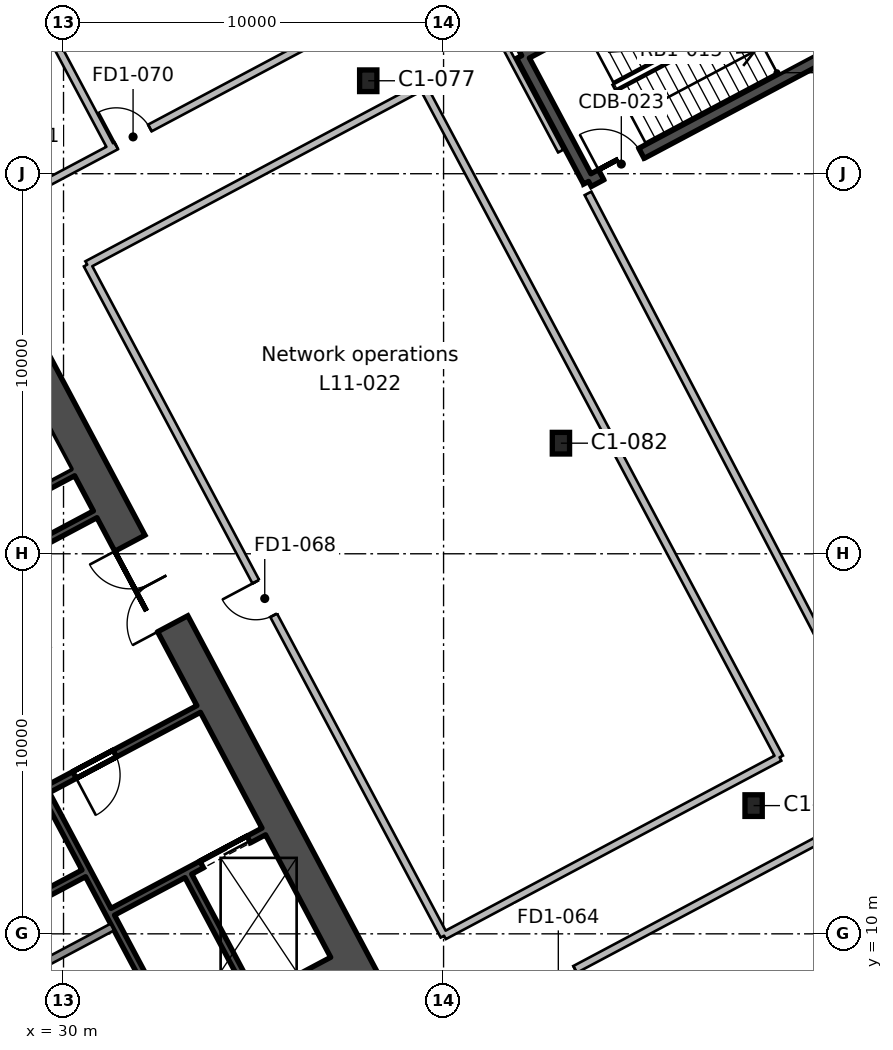
"""IFC4 building model, lengths in metres.
Left out: names, types, materials, properties, quantities, classifications, styles, units other than length and angle.
Written with IfcOpenShell. Run it as: python <this file> out.ifc"""

import sys

from ifc_helpers import new_model, si_unit, direction, frame, frame_2d, origin, origin_2d, place, context, subcontext, project, spatial, rectangle, i_section, extrude, element, fill, save


model = new_model("IFC4")
c1 = context("Model", 3, precision=1e-05, world=origin(), true_north=direction((0.0, 1.0)))
c2 = subcontext(c1, "Body", "Model", "MODEL_VIEW")
j1 = project(units=[si_unit("LENGTHUNIT", "METRE"), si_unit("PLANEANGLEUNIT", "RADIAN")], contexts=[c1])
p1 = place(None, origin())
s1 = spatial("IfcSite", under=j1, at=p1, CompositionType="ELEMENT")
p2 = place(p1, origin())
s2 = spatial("IfcBuilding", under=s1, at=p2, CompositionType="ELEMENT")
p3 = place(p2, frame((0.0, 0.0, 60.8)))
s3 = spatial("IfcBuildingStorey", under=s2, at=p3, CompositionType="ELEMENT", Elevation=60.8)
for number, where, z_axis, x_axis in (
    (1, (48.158, 13.374, 0.0), (0.0, 0.0, 1.0), (1.0, 0.0, 0.0)),
    (2, (43.088, 22.91, 0.0), (0.0, 0.0, 1.0), (1.0, 0.0, 0.0)),
    (3, (38.018, 32.446, 0.0), (0.0, 0.0, 1.0), (1.0, 0.0, 0.0)),
):
    element("IfcColumn", number, at=place(p3, frame(where, z_axis=z_axis, x_axis=x_axis)), inside=s3, PredefinedType="COLUMN", context=c2, shape_type="SweptSolid", body=[
        extrude(i_section(OverallWidth=0.455, OverallDepth=0.569, WebThickness=0.078, FlangeThickness=0.125, FilletRadius=0.015, at=origin_2d()), origin(), (0.0, 0.0, 1.0), 5.4),
    ])
p4 = place(p3, frame((37.849, 8.799, 0.0), z_axis=(0.0, 0.0, 1.0), x_axis=(-0.469465789982, 0.882950662289, 0.0)))
e4 = element("IfcWall", 4, at=p4, inside=s3, PredefinedType="SHEAR", context=c2, shape_type="SweptSolid", body=[
    extrude(rectangle(XDim=20.0, YDim=0.9, at=frame_2d((10.0, 0.0))), origin(), (0.0, 0.0, 1.0), 5.4),
])
p5 = place(p4, frame((10.6, 0.0, 0.0)))
e5 = element("IfcOpeningElement", 5, at=p5, cuts=e4, PredefinedType="OPENING", context=c2, shape_type="SweptSolid", body=[
    extrude(rectangle(XDim=2.4, YDim=2.4, at=frame_2d((1.2, 1.2))), frame((0.0, 0.46, 0.0), z_axis=(0.0, -1.0, 0.0), x_axis=(1.0, 0.0, 0.0)), (0.0, 0.0, 1.0), 0.92),
])
p6 = place(p3, frame((19.405, -0.498, 0.0), z_axis=(0.0, 0.0, 1.0), x_axis=(0.88294509198, 0.469476266226, 0.0)))
e6 = element("IfcWall", 6, at=p6, inside=s3, PredefinedType="SHEAR", context=c2, shape_type="SweptSolid", body=[
    extrude(rectangle(XDim=20.2, YDim=0.9, at=frame_2d((10.1, 0.0))), origin(), (0.0, 0.0, 1.0), 5.4),
])
p7 = place(p3, frame((32.968, 7.223, 0.0), z_axis=(0.0, 0.0, 1.0), x_axis=(-0.469480409012, 0.88294288918, 0.0)))
e7 = element("IfcWall", 7, at=p7, inside=s3, PredefinedType="SHEAR", context=c2, shape_type="SweptSolid", body=[
    extrude(rectangle(XDim=7.3, YDim=0.2, at=frame_2d((3.65, 0.0))), origin(), (0.0, 0.0, 1.0), 5.4),
])
p8 = place(p3, frame((34.999, 8.303, 0.0), z_axis=(0.0, 0.0, 1.0), x_axis=(-0.4694665462, 0.882950260207, 0.0)))
e8 = element("IfcWall", 8, at=p8, inside=s3, PredefinedType="SHEAR", context=c2, shape_type="SweptSolid", body=[
    extrude(rectangle(XDim=3.65, YDim=0.2, at=frame_2d((1.825, 0.0))), origin(), (0.0, 0.0, 1.0), 5.4),
])
p9 = place(p3, frame((26.692, 7.737, 0.0), z_axis=(0.0, 0.0, 1.0), x_axis=(0.882953967957, 0.469459572775, 0.0)))
e9 = element("IfcWall", 9, at=p9, inside=s3, PredefinedType="SOLIDWALL", context=c2, shape_type="SweptSolid", body=[
    extrude(rectangle(XDim=5.2, YDim=0.2, at=frame_2d((2.6, 0.0))), origin(), (0.0, 0.0, 1.0), 5.4),
])
p10 = place(p3, frame((31.296, 10.581, 0.0), z_axis=(0.0, 0.0, 1.0), x_axis=(0.882960433586, 0.469447412093, 0.0)))
e10 = element("IfcWall", 10, at=p10, inside=s3, PredefinedType="SHEAR", context=c2, shape_type="SweptSolid", body=[
    extrude(rectangle(XDim=4.5, YDim=0.2, at=frame_2d((2.25, 0.0))), origin(), (0.0, 0.0, 1.0), 5.4),
])
p11 = place(p10, frame((2.65, 0.0, 0.0)))
e11 = element("IfcOpeningElement", 11, at=p11, cuts=e10, PredefinedType="OPENING", context=c2, shape_type="SweptSolid", body=[
    extrude(rectangle(XDim=1.4, YDim=2.4, at=frame_2d((0.7, 1.2))), frame((0.0, 0.11, 0.0), z_axis=(0.0, -1.0, 0.0), x_axis=(1.0, 0.0, 0.0)), (0.0, 0.0, 1.0), 0.22),
])
p12 = place(p3, frame((25.941, 9.15, 0.0), z_axis=(0.0, 0.0, 1.0), x_axis=(0.882953967957, 0.469459572775, 0.0)))
e12 = element("IfcWall", 12, at=p12, inside=s3, PredefinedType="SHEAR", context=c2, shape_type="SweptSolid", body=[
    extrude(rectangle(XDim=5.2, YDim=0.2, at=frame_2d((2.6, 0.0))), origin(), (0.0, 0.0, 1.0), 5.4),
])
p13 = place(p3, frame((24.726, 11.222, 0.0), z_axis=(0.0, 0.0, 1.0), x_axis=(0.882940221191, 0.469485426614, 0.0)))
e13 = element("IfcWall", 13, at=p13, inside=s3, PredefinedType="SHEAR", context=c2, shape_type="SweptSolid", body=[
    extrude(rectangle(XDim=10.0, YDim=0.2, at=frame_2d((5.0, 0.0))), origin(), (0.0, 0.0, 1.0), 5.4),
])
p14 = place(p13, frame((6.3, 0.0, 0.0)))
e14 = element("IfcOpeningElement", 14, at=p14, cuts=e13, PredefinedType="OPENING", context=c2, shape_type="SweptSolid", body=[
    extrude(rectangle(XDim=1.2, YDim=2.1, at=frame_2d((0.6, 1.05))), frame((0.0, 0.11, 0.0), z_axis=(0.0, -1.0, 0.0), x_axis=(1.0, 0.0, 0.0)), (0.0, 0.0, 1.0), 0.22),
])
p15 = place(p13, frame((2.25, 0.0, 0.0)))
e15 = element("IfcOpeningElement", 15, at=p15, cuts=e13, PredefinedType="OPENING", context=c2, shape_type="SweptSolid", body=[
    extrude(rectangle(XDim=0.9, YDim=2.1, at=frame_2d((0.45, 1.05))), frame((0.0, 0.11, 0.0), z_axis=(0.0, -1.0, 0.0), x_axis=(1.0, 0.0, 0.0)), (0.0, 0.0, 1.0), 0.22),
])
p16 = place(p3, frame((23.769, 17.282, 0.0), z_axis=(0.0, 0.0, 1.0), x_axis=(0.882940221191, 0.469485426614, 0.0)))
e16 = element("IfcWall", 16, at=p16, inside=s3, PredefinedType="SHEAR", context=c2, shape_type="SweptSolid", body=[
    extrude(rectangle(XDim=8.0, YDim=0.2, at=frame_2d((4.0, 0.0))), origin(), (0.0, 0.0, 1.0), 5.4),
])
p17 = place(p3, frame((23.182, 18.385, 0.0), z_axis=(0.0, 0.0, 1.0), x_axis=(0.88295287151, 0.469461634952, 0.0)))
e17 = element("IfcWall", 17, at=p17, inside=s3, PredefinedType="SHEAR", context=c2, shape_type="SweptSolid", body=[
    extrude(rectangle(XDim=8.0, YDim=0.2, at=frame_2d((4.0, 0.0))), origin(), (0.0, 0.0, 1.0), 5.4),
])
p18 = place(p3, frame((51.145, 33.693, 0.0), z_axis=(0.0, 0.0, 1.0), x_axis=(-0.882945809314, -0.469474917132, 0.0)))
e18 = element("IfcWall", 18, at=p18, inside=s3, PredefinedType="SHEAR", context=c2, shape_type="SweptSolid", body=[
    extrude(rectangle(XDim=8.3, YDim=0.3, at=frame_2d((4.15, 0.0))), origin(), (0.0, 0.0, 1.0), 5.4),
])
p19 = place(p18, frame((6.725, 0.0, 0.0)))
e19 = element("IfcOpeningElement", 19, at=p19, cuts=e18, PredefinedType="OPENING", context=c2, shape_type="SweptSolid", body=[
    extrude(rectangle(XDim=1.2, YDim=2.1, at=frame_2d((0.6, 1.05))), frame((0.0, 0.16, 0.0), z_axis=(0.0, -1.0, 0.0), x_axis=(1.0, 0.0, 0.0)), (0.0, 0.0, 1.0), 0.32),
])
p20 = place(p3, frame((43.816, 29.796, 0.0), z_axis=(0.0, 0.0, 1.0), x_axis=(-0.46946936446, 0.882948761726, 0.0)))
e20 = element("IfcWall", 20, at=p20, inside=s3, PredefinedType="SHEAR", context=c2, shape_type="SweptSolid", body=[
    extrude(rectangle(XDim=3.75, YDim=0.3, at=frame_2d((1.875, 0.0))), origin(), (0.0, 0.0, 1.0), 5.4),
])
p21 = place(p3, frame((42.055, 33.107, 0.0), z_axis=(0.0, 0.0, 1.0), x_axis=(0.882945809314, 0.469474917132, 0.0)))
e21 = element("IfcWall", 21, at=p21, inside=s3, PredefinedType="SHEAR", context=c2, shape_type="SweptSolid", body=[
    extrude(rectangle(XDim=8.3, YDim=0.3, at=frame_2d((4.15, 0.0))), origin(), (0.0, 0.0, 1.0), 5.4),
])
p22 = place(p3, frame((0.0, 14.044, 0.0), z_axis=(0.0, 0.0, 1.0), x_axis=(0.882943219941, 0.469479786955, 0.0)))
e22 = element("IfcWall", 22, at=p22, inside=s3, PredefinedType="PARTITIONING", context=c2, shape_type="SweptSolid", body=[
    extrude(rectangle(XDim=65.607, YDim=0.2, at=frame_2d((32.803, 0.0))), origin(), (0.0, 0.0, 1.0), 5.0),
])
p23 = place(p22, frame((35.55, 0.0, 0.0)))
e23 = element("IfcOpeningElement", 23, at=p23, cuts=e22, PredefinedType="OPENING", context=c2, shape_type="SweptSolid", body=[
    extrude(rectangle(XDim=1.0, YDim=2.1, at=frame_2d((0.5, 1.05))), frame((0.0, 0.11, 0.0), z_axis=(0.0, -1.0, 0.0), x_axis=(1.0, 0.0, 0.0)), (0.0, 0.0, 1.0), 0.22),
])
p24 = place(p22, frame((32.15, 0.0, 0.0)))
e24 = element("IfcOpeningElement", 24, at=p24, cuts=e22, PredefinedType="OPENING", context=c2, shape_type="SweptSolid", body=[
    extrude(rectangle(XDim=1.0, YDim=2.1, at=frame_2d((0.5, 1.05))), frame((0.0, 0.11, 0.0), z_axis=(0.0, -1.0, 0.0), x_axis=(1.0, 0.0, 0.0)), (0.0, 0.0, 1.0), 0.22),
])
p25 = place(p22, frame((29.75, 0.0, 0.0)))
e25 = element("IfcOpeningElement", 25, at=p25, cuts=e22, PredefinedType="OPENING", context=c2, shape_type="SweptSolid", body=[
    extrude(rectangle(XDim=1.0, YDim=2.1, at=frame_2d((0.5, 1.05))), frame((0.0, 0.11, 0.0), z_axis=(0.0, -1.0, 0.0), x_axis=(1.0, 0.0, 0.0)), (0.0, 0.0, 1.0), 0.22),
])
p26 = place(p22, frame((13.95, 0.0, 0.0)))
e26 = element("IfcOpeningElement", 26, at=p26, cuts=e22, PredefinedType="OPENING", context=c2, shape_type="SweptSolid", body=[
    extrude(rectangle(XDim=1.0, YDim=2.1, at=frame_2d((0.5, 1.05))), frame((0.0, 0.11, 0.0), z_axis=(0.0, -1.0, 0.0), x_axis=(1.0, 0.0, 0.0)), (0.0, 0.0, 1.0), 0.22),
])
p27 = place(p3, frame((69.57, 22.948, 0.0), z_axis=(0.0, 0.0, 1.0), x_axis=(-0.882939582192, -0.469486628349, 0.0)))
e27 = element("IfcWall", 27, at=p27, inside=s3, PredefinedType="PARTITIONING", context=c2, shape_type="SweptSolid", body=[
    extrude(rectangle(XDim=63.39, YDim=0.2, at=frame_2d((31.695, 0.0))), origin(), (0.0, 0.0, 1.0), 5.0),
])
p28 = place(p27, frame((41.971, 0.0, 0.0)))
e28 = element("IfcOpeningElement", 28, at=p28, cuts=e27, PredefinedType="OPENING", context=c2, shape_type="SweptSolid", body=[
    extrude(rectangle(XDim=1.0, YDim=2.1, at=frame_2d((0.5, 1.05))), frame((0.0, 0.11, 0.0), z_axis=(0.0, -1.0, 0.0), x_axis=(1.0, 0.0, 0.0)), (0.0, 0.0, 1.0), 0.22),
])
p29 = place(p27, frame((31.371, 0.0, 0.0)))
e29 = element("IfcOpeningElement", 29, at=p29, cuts=e27, PredefinedType="OPENING", context=c2, shape_type="SweptSolid", body=[
    extrude(rectangle(XDim=1.0, YDim=2.1, at=frame_2d((0.5, 1.05))), frame((0.0, 0.11, 0.0), z_axis=(0.0, -1.0, 0.0), x_axis=(1.0, 0.0, 0.0)), (0.0, 0.0, 1.0), 0.22),
])
p30 = place(p27, frame((29.571, 0.0, 0.0)))
e30 = element("IfcOpeningElement", 30, at=p30, cuts=e27, PredefinedType="OPENING", context=c2, shape_type="SweptSolid", body=[
    extrude(rectangle(XDim=1.0, YDim=2.1, at=frame_2d((0.5, 1.05))), frame((0.0, 0.11, 0.0), z_axis=(0.0, -1.0, 0.0), x_axis=(1.0, 0.0, 0.0)), (0.0, 0.0, 1.0), 0.22),
])
p31 = place(p27, frame((13.071, 0.0, 0.0)))
e31 = element("IfcOpeningElement", 31, at=p31, cuts=e27, PredefinedType="OPENING", context=c2, shape_type="SweptSolid", body=[
    extrude(rectangle(XDim=1.0, YDim=2.1, at=frame_2d((0.5, 1.05))), frame((0.0, 0.11, 0.0), z_axis=(0.0, -1.0, 0.0), x_axis=(1.0, 0.0, 0.0)), (0.0, 0.0, 1.0), 0.22),
])
p32 = place(p3, frame((31.254, 30.682, 0.0), z_axis=(0.0, 0.0, 1.0), x_axis=(-0.469464286377, 0.882951461756, 0.0)))
e32 = element("IfcWall", 32, at=p32, inside=s3, PredefinedType="PARTITIONING", context=c2, shape_type="SweptSolid", body=[
    extrude(rectangle(XDim=5.583, YDim=0.2, at=frame_2d((2.791, 0.0))), origin(), (0.0, 0.0, 1.0), 5.0),
])
p33 = place(p3, frame((41.572, 33.43, 0.0), z_axis=(0.0, 0.0, 1.0), x_axis=(0.469510863882, -0.882926694974, 0.0)))
e33 = element("IfcWall", 33, at=p33, inside=s3, PredefinedType="PARTITIONING", context=c2, shape_type="SweptSolid", body=[
    extrude(rectangle(XDim=3.212, YDim=0.15, at=frame_2d((1.606, 0.0))), origin(), (0.0, 0.0, 1.0), 5.0),
])
p34 = place(p3, frame((43.801, 29.483, 0.0), z_axis=(0.0, 0.0, 1.0), x_axis=(0.462864260364, -0.886429171721, 0.0)))
e34 = element("IfcWall", 34, at=p34, inside=s3, PredefinedType="PARTITIONING", context=c2, shape_type="SweptSolid", body=[
    extrude(rectangle(XDim=15.469, YDim=0.2, at=frame_2d((7.734, 0.0))), origin(), (0.0, 0.0, 1.0), 5.0),
])
p35 = place(p3, frame((30.623, 27.608, 0.0), z_axis=(0.0, 0.0, 1.0), x_axis=(0.882940863385, 0.469484218867, 0.0)))
e35 = element("IfcWall", 35, at=p35, inside=s3, PredefinedType="PARTITIONING", context=c2, shape_type="SweptSolid", body=[
    extrude(rectangle(XDim=10.0, YDim=0.2, at=frame_2d((5.0, 0.0))), origin(), (0.0, 0.0, 1.0), 5.0),
])
p36 = place(p3, frame((39.453, 32.303, 0.0), z_axis=(0.0, 0.0, 1.0), x_axis=(0.469461333319, -0.882953031887, 0.0)))
e36 = element("IfcWall", 36, at=p36, inside=s3, PredefinedType="PARTITIONING", context=c2, shape_type="SweptSolid", body=[
    extrude(rectangle(XDim=20.0, YDim=0.2, at=frame_2d((10.0, 0.0))), origin(), (0.0, 0.0, 1.0), 5.0),
])
p37 = place(p3, frame((48.842, 14.644, 0.0), z_axis=(0.0, 0.0, 1.0), x_axis=(-0.882924718888, -0.46951457994, 0.0)))
e37 = element("IfcWall", 37, at=p37, inside=s3, PredefinedType="PARTITIONING", context=c2, shape_type="SweptSolid", body=[
    extrude(rectangle(XDim=10.0, YDim=0.2, at=frame_2d((5.0, 0.0))), origin(), (0.0, 0.0, 1.0), 5.0),
])
p38 = place(p3, frame((40.013, 9.949, 0.0), z_axis=(0.0, 0.0, 1.0), x_axis=(-0.469489882812, 0.882937851685, 0.0)))
e38 = element("IfcWall", 38, at=p38, inside=s3, PredefinedType="PARTITIONING", context=c2, shape_type="SweptSolid", body=[
    extrude(rectangle(XDim=20.0, YDim=0.2, at=frame_2d((10.0, 0.0))), origin(), (0.0, 0.0, 1.0), 5.0),
])
p39 = place(p38, frame((9.55, 0.0, 0.0)))
e39 = element("IfcOpeningElement", 39, at=p39, cuts=e38, PredefinedType="OPENING", context=c2, shape_type="SweptSolid", body=[
    extrude(rectangle(XDim=1.0, YDim=2.1, at=frame_2d((0.5, 1.05))), frame((0.0, 0.11, 0.0), z_axis=(0.0, -1.0, 0.0), x_axis=(1.0, 0.0, 0.0)), (0.0, 0.0, 1.0), 0.22),
])
p40 = place(p5, origin())
e40 = element("IfcDoor", 40, at=p40, inside=s3, OperationType="DOUBLE_DOOR_SINGLE_SWING", PredefinedType="DOOR", context=c2, shape_type="SweptSolid", body=[
    extrude(rectangle(XDim=2.4, YDim=2.4, at=frame_2d((1.2, 1.2))), frame((0.0, 0.025, 0.0), z_axis=(0.0, -1.0, 0.0), x_axis=(1.0, 0.0, 0.0)), (0.0, 0.0, 1.0), 0.05),
])
fill(e5, e40)
p41 = place(p14, frame((1.2, 0.0, 0.0), z_axis=(0.0, 0.0, 1.0), x_axis=(-1.0, 0.0, 0.0)))
e41 = element("IfcDoor", 41, at=p41, inside=s3, OperationType="SINGLE_SWING_RIGHT", PredefinedType="DOOR", context=c2, shape_type="SweptSolid", body=[
    extrude(rectangle(XDim=1.2, YDim=2.1, at=frame_2d((0.6, 1.05))), frame((0.0, 0.025, 0.0), z_axis=(0.0, -1.0, 0.0), x_axis=(1.0, 0.0, 0.0)), (0.0, 0.0, 1.0), 0.05),
])
fill(e14, e41)
p42 = place(p11, origin())
e42 = element("IfcDoor", 42, at=p42, inside=s3, OperationType="DOUBLE_DOOR_SLIDING", PredefinedType="DOOR", context=c2, shape_type="SweptSolid", body=[
    extrude(rectangle(XDim=1.4, YDim=2.4, at=frame_2d((0.7, 1.2))), frame((0.0, 0.025, 0.0), z_axis=(0.0, -1.0, 0.0), x_axis=(1.0, 0.0, 0.0)), (0.0, 0.0, 1.0), 0.05),
])
fill(e11, e42)
p43 = place(p19, frame((1.2, 0.0, 0.0), z_axis=(0.0, 0.0, 1.0), x_axis=(-1.0, 0.0, 0.0)))
e43 = element("IfcDoor", 43, at=p43, inside=s3, OperationType="SINGLE_SWING_LEFT", PredefinedType="DOOR", context=c2, shape_type="SweptSolid", body=[
    extrude(rectangle(XDim=1.2, YDim=2.1, at=frame_2d((0.6, 1.05))), frame((0.0, 0.025, 0.0), z_axis=(0.0, -1.0, 0.0), x_axis=(1.0, 0.0, 0.0)), (0.0, 0.0, 1.0), 0.05),
])
fill(e19, e43)
p44 = place(p23, origin())
e44 = element("IfcDoor", 44, at=p44, inside=s3, OperationType="SINGLE_SWING_LEFT", PredefinedType="DOOR", context=c2, shape_type="SweptSolid", body=[
    extrude(rectangle(XDim=1.0, YDim=2.1, at=frame_2d((0.5, 1.05))), frame((0.0, 0.025, 0.0), z_axis=(0.0, -1.0, 0.0), x_axis=(1.0, 0.0, 0.0)), (0.0, 0.0, 1.0), 0.05),
])
fill(e23, e44)
p45 = place(p30, origin())
e45 = element("IfcDoor", 45, at=p45, inside=s3, OperationType="SINGLE_SWING_RIGHT", PredefinedType="DOOR", context=c2, shape_type="SweptSolid", body=[
    extrude(rectangle(XDim=1.0, YDim=2.1, at=frame_2d((0.5, 1.05))), frame((0.0, 0.025, 0.0), z_axis=(0.0, -1.0, 0.0), x_axis=(1.0, 0.0, 0.0)), (0.0, 0.0, 1.0), 0.05),
])
fill(e30, e45)
p46 = place(p39, origin())
e46 = element("IfcDoor", 46, at=p46, inside=s3, OperationType="SINGLE_SWING_RIGHT", PredefinedType="DOOR", context=c2, shape_type="SweptSolid", body=[
    extrude(rectangle(XDim=1.0, YDim=2.1, at=frame_2d((0.5, 1.05))), frame((0.0, 0.025, 0.0), z_axis=(0.0, -1.0, 0.0), x_axis=(1.0, 0.0, 0.0)), (0.0, 0.0, 1.0), 0.05),
])
fill(e39, e46)
save(model, sys.argv[1])
